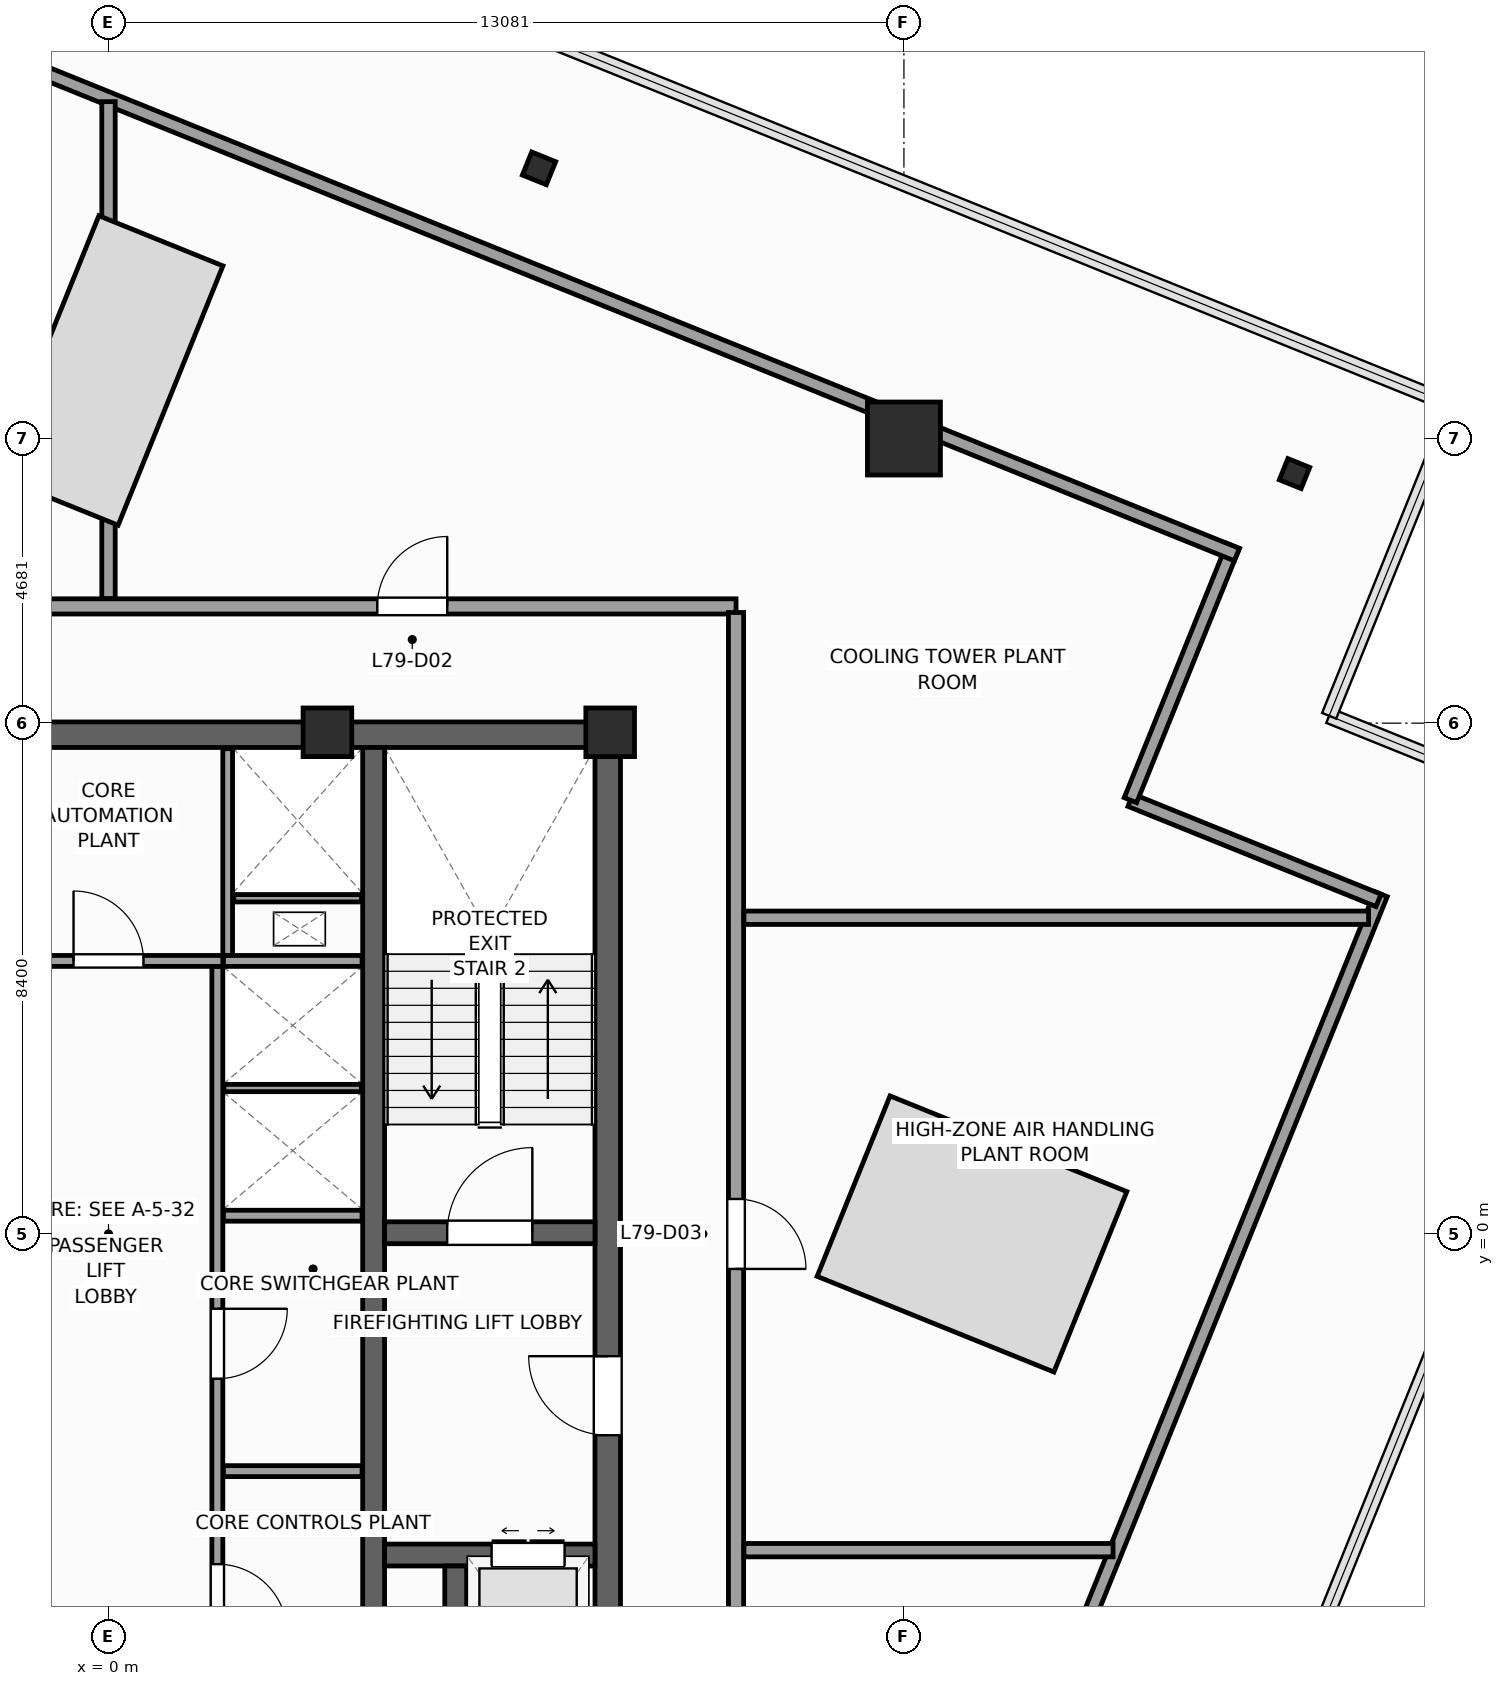
"""IFC4 building model, lengths in metres.
Left out: names, types, materials, properties, quantities, classifications, styles, units other than length and angle.
Written with IfcOpenShell. Run it as: python <this file> out.ifc"""

import sys

from ifc_helpers import new_model, si_unit, direction, frame, frame_2d, origin, origin_2d, place, context, subcontext, project, spatial, rectangle, i_section, extrude, source, transform, mapped, element, fill, save


model = new_model("IFC4")
c1 = context("Model", 3, precision=1e-05, world=origin(), true_north=direction((0.0, 1.0)))
c2 = subcontext(c1, "Body", "Model", "MODEL_VIEW")
j1 = project(units=[si_unit("LENGTHUNIT", "METRE"), si_unit("PLANEANGLEUNIT", "RADIAN")], contexts=[c1])
p1 = place(None, origin())
s1 = spatial("IfcSite", under=j1, at=p1, CompositionType="ELEMENT")
p2 = place(p1, origin())
s2 = spatial("IfcBuilding", under=s1, at=p2, CompositionType="ELEMENT")
p3 = place(p2, frame((0.0, 0.0, 321.6)))
s3 = spatial("IfcBuildingStorey", under=s2, at=p3, CompositionType="ELEMENT", Elevation=321.6)
p4 = place(p3, frame((-8.42, 8.21, 0.0), z_axis=(0.0, 0.0, 1.0), x_axis=(1.0, 0.0, 0.0)))
e1 = element("IfcWall", 1, at=p4, inside=s3, PredefinedType="SHEAR", context=c2, shape_type="SweptSolid", body=[
    extrude(rectangle(XDim=16.84, YDim=0.42, at=frame_2d((8.42, 0.0))), origin(), (0.0, 0.0, 1.0), 4.0),
])
p5 = place(p3, frame((8.21, -8.0, 0.0), z_axis=(0.0, 0.0, 1.0), x_axis=(0.0, 1.0, 0.0)))
e2 = element("IfcWall", 2, at=p5, inside=s3, PredefinedType="SHEAR", context=c2, shape_type="SweptSolid", body=[
    extrude(rectangle(XDim=16.0, YDim=0.42, at=frame_2d((8.0, 0.0))), origin(), (0.0, 0.0, 1.0), 4.0),
])
p6 = place(p5, frame((4.69, 0.0, 0.0)))
e3 = element("IfcOpeningElement", 3, at=p6, cuts=e2, PredefinedType="OPENING", context=c2, shape_type="SweptSolid", body=[
    extrude(rectangle(XDim=1.3, YDim=2.2, at=frame_2d((0.65, 1.1))), frame((0.0, 0.22, 0.0), z_axis=(0.0, -1.0, 0.0), x_axis=(1.0, 0.0, 0.0)), (0.0, 0.0, 1.0), 0.44),
])
p7 = place(p3, frame((4.36, -8.0, 0.0), z_axis=(0.0, 0.0, 1.0), x_axis=(0.0, 1.0, 0.0)))
e4 = element("IfcWall", 4, at=p7, inside=s3, PredefinedType="SHEAR", context=c2, shape_type="SweptSolid", body=[
    extrude(rectangle(XDim=16.0, YDim=0.36, at=frame_2d((8.0, 0.0))), origin(), (0.0, 0.0, 1.0), 4.0),
])
p8 = place(p3, frame((4.54, 0.02, 0.0), z_axis=(0.0, 0.0, 1.0), x_axis=(1.0, 0.0, 0.0)))
e5 = element("IfcWall", 5, at=p8, inside=s3, PredefinedType="SHEAR", context=c2, shape_type="SweptSolid", body=[
    extrude(rectangle(XDim=3.46, YDim=0.36, at=frame_2d((1.73, 0.0))), origin(), (0.0, 0.0, 1.0), 4.0),
])
p9 = place(p8, frame((1.03, 0.0, 0.0)))
e6 = element("IfcOpeningElement", 6, at=p9, cuts=e5, PredefinedType="OPENING", context=c2, shape_type="SweptSolid", body=[
    extrude(rectangle(XDim=1.4, YDim=2.2, at=frame_2d((0.7, 1.1))), frame((0.0, 0.19, 0.0), z_axis=(0.0, -1.0, 0.0), x_axis=(1.0, 0.0, 0.0)), (0.0, 0.0, 1.0), 0.38),
])
p10 = place(p3, frame((4.54, -5.28, 0.0), z_axis=(0.0, 0.0, 1.0), x_axis=(1.0, 0.0, 0.0)))
e7 = element("IfcWall", 7, at=p10, inside=s3, PredefinedType="SHEAR", context=c2, shape_type="SweptSolid", body=[
    extrude(rectangle(XDim=3.46, YDim=0.36, at=frame_2d((1.73, 0.0))), origin(), (0.0, 0.0, 1.0), 4.0),
])
p11 = place(p10, frame((1.76, 0.0, 0.0)))
e8 = element("IfcOpeningElement", 8, at=p11, cuts=e7, PredefinedType="OPENING", context=c2, shape_type="SweptSolid", body=[
    extrude(rectangle(XDim=1.2, YDim=2.25, at=frame_2d((0.6, 1.125))), frame((0.0, 0.19, 0.0), z_axis=(0.0, -1.0, 0.0), x_axis=(1.0, 0.0, 0.0)), (0.0, 0.0, 1.0), 0.38),
])
p12 = place(p3, frame((5.71, -8.0, 0.0), z_axis=(0.0, 0.0, 1.0), x_axis=(0.0, 1.0, 0.0)))
e9 = element("IfcWall", 9, at=p12, inside=s3, PredefinedType="SHEAR", context=c2, shape_type="SweptSolid", body=[
    extrude(rectangle(XDim=2.54, YDim=0.36, at=frame_2d((1.27, 0.0))), origin(), (0.0, 0.0, 1.0), 4.0),
])
m1 = source(origin(), c2, "Body", "SweptSolid", [
    extrude(rectangle(XDim=0.8, YDim=0.8, at=origin_2d()), origin(), (0.0, 0.0, 1.0), 4.0),
])
for number, where, z_axis, x_axis in (
    (10, (8.25, 8.25, 0.0), (0.0, 0.0, 1.0), (1.0, 0.0, 0.0)),
    (11, (3.6, 8.25, 0.0), (0.0, 0.0, 1.0), (1.0, 0.0, 0.0)),
):
    element("IfcColumn", number, at=place(p3, frame(where, z_axis=z_axis, x_axis=x_axis)), inside=s3, PredefinedType="PILASTER", context=c2, shape_type="MappedRepresentation", body=[
        mapped(m1, transform((0.0, 0.0, 0.0), scale=1.0)),
    ])
m2 = source(origin(), c2, "Body", "SweptSolid", [
    extrude(rectangle(XDim=1.2, YDim=1.2, at=origin_2d()), origin(), (0.0, 0.0, 1.0), 4.0),
])
p13 = place(p3, frame((13.081, 13.081, 0.0), z_axis=(0.0, 0.0, 1.0), x_axis=(1.0, 0.0, 0.0)))
e12 = element("IfcColumn", 12, at=p13, inside=s3, PredefinedType="COLUMN", context=c2, shape_type="MappedRepresentation", body=[
    mapped(m2, transform((0.0, 0.0, 0.0), scale=1.0)),
])
m3 = source(origin(), c2, "Body", "SweptSolid", [
    extrude(i_section(OverallWidth=0.376, OverallDepth=0.387, WebThickness=0.02, FlangeThickness=0.032, FilletRadius=0.015, at=origin_2d()), origin(), (0.0, 0.0, 1.0), 4.0),
])
p14 = place(p3, frame((19.504, 12.504, 0.0), z_axis=(0.0, 0.0, 1.0), x_axis=(0.374606593416, 0.927183854567, 0.0)))
e13 = element("IfcColumn", 13, at=p14, inside=s3, PredefinedType="COLUMN", context=c2, shape_type="MappedRepresentation", body=[
    mapped(m3, transform((0.0, 0.0, 0.0), scale=1.0)),
])
m4 = source(origin(), c2, "Body", "SweptSolid", [
    extrude(i_section(OverallWidth=0.409, OverallDepth=0.425, WebThickness=0.024, FlangeThickness=0.039, FilletRadius=0.015, at=origin_2d()), origin(), (0.0, 0.0, 1.0), 4.0),
])
p15 = place(p3, frame((7.08, 17.524, 0.0), z_axis=(0.0, 0.0, 1.0), x_axis=(0.374606593416, 0.927183854567, 0.0)))
e14 = element("IfcColumn", 14, at=p15, inside=s3, PredefinedType="COLUMN", context=c2, shape_type="MappedRepresentation", body=[
    mapped(m4, transform((0.0, 0.0, 0.0), scale=1.0)),
])
p16 = place(p3, frame((1.79, -7.98, 0.0), z_axis=(0.0, 0.0, 1.0), x_axis=(0.0, 1.0, 0.0)))
e15 = element("IfcWall", 15, at=p16, inside=s3, PredefinedType="PARTITIONING", context=c2, shape_type="SweptSolid", body=[
    extrude(rectangle(XDim=12.38, YDim=0.18, at=frame_2d((6.19, 0.0))), origin(), (0.0, 0.0, 1.0), 3.7),
])
p17 = place(p16, frame((1.4, 0.0, 0.0)))
e16 = element("IfcOpeningElement", 16, at=p17, cuts=e15, PredefinedType="OPENING", context=c2, shape_type="SweptSolid", body=[
    extrude(rectangle(XDim=1.15, YDim=2.25, at=frame_2d((0.575, 1.125))), frame((0.0, 0.1, 0.0), z_axis=(0.0, -1.0, 0.0), x_axis=(1.0, 0.0, 0.0)), (0.0, 0.0, 1.0), 0.2),
])
p18 = place(p16, frame((5.6, 0.0, 0.0)))
e17 = element("IfcOpeningElement", 17, at=p18, cuts=e15, PredefinedType="OPENING", context=c2, shape_type="SweptSolid", body=[
    extrude(rectangle(XDim=1.15, YDim=2.25, at=frame_2d((0.575, 1.125))), frame((0.0, 0.1, 0.0), z_axis=(0.0, -1.0, 0.0), x_axis=(1.0, 0.0, 0.0)), (0.0, 0.0, 1.0), 0.2),
])
p19 = place(p3, frame((-1.88, 4.49, 0.0), z_axis=(0.0, 0.0, 1.0), x_axis=(1.0, 0.0, 0.0)))
e18 = element("IfcWall", 18, at=p19, inside=s3, PredefinedType="PARTITIONING", context=c2, shape_type="SweptSolid", body=[
    extrude(rectangle(XDim=3.76, YDim=0.18, at=frame_2d((1.88, 0.0))), origin(), (0.0, 0.0, 1.0), 3.7),
])
p20 = place(p19, frame((1.305, 0.0, 0.0)))
e19 = element("IfcOpeningElement", 19, at=p20, cuts=e18, PredefinedType="OPENING", context=c2, shape_type="SweptSolid", body=[
    extrude(rectangle(XDim=1.15, YDim=2.25, at=frame_2d((0.575, 1.125))), frame((0.0, 0.1, 0.0), z_axis=(0.0, -1.0, 0.0), x_axis=(1.0, 0.0, 0.0)), (0.0, 0.0, 1.0), 0.2),
])
for number, where, z_axis, x_axis in (
    (20, (1.89, -3.9, 0.0), (0.0, 0.0, 1.0), (1.0, 0.0, 0.0)),
    (21, (1.89, 0.3, 0.0), (0.0, 0.0, 1.0), (1.0, 0.0, 0.0)),
    (22, (1.89, 4.49, 0.0), (0.0, 0.0, 1.0), (1.0, 0.0, 0.0)),
):
    element("IfcWall", number, at=place(p3, frame(where, z_axis=z_axis, x_axis=x_axis)), inside=s3, PredefinedType="PARTITIONING", context=c2, shape_type="SweptSolid", body=[
        extrude(rectangle(XDim=2.28, YDim=0.18, at=frame_2d((1.14, 0.0))), origin(), (0.0, 0.0, 1.0), 3.7),
    ])
p21 = place(p3, frame((1.9, 2.4, 0.0), z_axis=(0.0, 0.0, 1.0), x_axis=(1.0, 0.0, 0.0)))
e23 = element("IfcWall", 23, at=p21, inside=s3, PredefinedType="PARTITIONING", context=c2, shape_type="SweptSolid", body=[
    extrude(rectangle(XDim=2.26, YDim=0.12, at=frame_2d((1.13, 0.0))), origin(), (0.0, 0.0, 1.0), 3.7),
])
p22 = place(p3, frame((1.96, 4.58, 0.0), z_axis=(0.0, 0.0, 1.0), x_axis=(0.0, 1.0, 0.0)))
e24 = element("IfcWall", 24, at=p22, inside=s3, PredefinedType="PARTITIONING", context=c2, shape_type="SweptSolid", body=[
    extrude(rectangle(XDim=3.4, YDim=0.16, at=frame_2d((1.7, 0.0))), origin(), (0.0, 0.0, 1.0), 3.7),
])
p23 = place(p3, frame((2.06, 5.52, 0.0), z_axis=(0.0, 0.0, 1.0), x_axis=(1.0, 0.0, 0.0)))
e25 = element("IfcWall", 25, at=p23, inside=s3, PredefinedType="PARTITIONING", context=c2, shape_type="SweptSolid", body=[
    extrude(rectangle(XDim=2.1, YDim=0.12, at=frame_2d((1.05, 0.0))), origin(), (0.0, 0.0, 1.0), 3.7),
])
p24 = place(p3, frame((11.172, -18.556, 0.0), z_axis=(0.0, 0.0, 1.0), x_axis=(0.374611707018, 0.927181788521, 0.0)))
e26 = element("IfcWall", 26, at=p24, inside=s3, PredefinedType="PARTITIONING", context=c2, shape_type="SweptSolid", body=[
    extrude(rectangle(XDim=26.04, YDim=0.22, at=frame_2d((13.02, 0.0))), origin(), (0.0, 0.0, 1.0), 3.05),
])
p25 = place(p3, frame((20.886, 5.486, 0.0), z_axis=(0.0, 0.0, 1.0), x_axis=(-0.927189216671, 0.374593321469, 0.0)))
e27 = element("IfcWall", 27, at=p25, inside=s3, PredefinedType="PARTITIONING", context=c2, shape_type="SweptSolid", body=[
    extrude(rectangle(XDim=4.4, YDim=0.22, at=frame_2d((2.2, 0.0))), origin(), (0.0, 0.0, 1.0), 3.7),
])
p26 = place(p3, frame((16.806, 7.134, 0.0), z_axis=(0.0, 0.0, 1.0), x_axis=(0.374599091925, 0.927186885331, 0.0)))
e28 = element("IfcWall", 28, at=p26, inside=s3, PredefinedType="PARTITIONING", context=c2, shape_type="SweptSolid", body=[
    extrude(rectangle(XDim=4.51, YDim=0.22, at=frame_2d((2.255, 0.0))), origin(), (0.0, 0.0, 1.0), 3.7),
])
p27 = place(p3, frame((18.556, 11.172, 0.0), z_axis=(0.0, 0.0, 1.0), x_axis=(-0.927181788521, 0.374611707018, 0.0)))
e29 = element("IfcWall", 29, at=p27, inside=s3, PredefinedType="PARTITIONING", context=c2, shape_type="SweptSolid", body=[
    extrude(rectangle(XDim=26.04, YDim=0.22, at=frame_2d((13.02, 0.0))), origin(), (0.0, 0.0, 1.0), 3.05),
])
p28 = place(p3, frame((-10.32, 10.32, 0.0), z_axis=(0.0, 0.0, 1.0), x_axis=(1.0, 0.0, 0.0)))
e30 = element("IfcWall", 30, at=p28, inside=s3, PredefinedType="PARTITIONING", context=c2, shape_type="SweptSolid", body=[
    extrude(rectangle(XDim=20.64, YDim=0.25, at=frame_2d((10.32, 0.0))), origin(), (0.0, 0.0, 1.0), 3.7),
])
p29 = place(p28, frame((4.75, 0.0, 0.0)))
e31 = element("IfcOpeningElement", 31, at=p29, cuts=e30, PredefinedType="OPENING", context=c2, shape_type="SweptSolid", body=[
    extrude(rectangle(XDim=1.15, YDim=2.25, at=frame_2d((0.575, 1.125))), frame((0.0, 0.135, 0.0), z_axis=(0.0, -1.0, 0.0), x_axis=(1.0, 0.0, 0.0)), (0.0, 0.0, 1.0), 0.27),
])
p30 = place(p28, frame((14.74, 0.0, 0.0)))
e32 = element("IfcOpeningElement", 32, at=p30, cuts=e30, PredefinedType="OPENING", context=c2, shape_type="SweptSolid", body=[
    extrude(rectangle(XDim=1.15, YDim=2.25, at=frame_2d((0.575, 1.125))), frame((0.0, 0.135, 0.0), z_axis=(0.0, -1.0, 0.0), x_axis=(1.0, 0.0, 0.0)), (0.0, 0.0, 1.0), 0.27),
])
p31 = place(p3, frame((10.32, -10.22, 0.0), z_axis=(0.0, 0.0, 1.0), x_axis=(0.0, 1.0, 0.0)))
e33 = element("IfcWall", 33, at=p31, inside=s3, PredefinedType="PARTITIONING", context=c2, shape_type="SweptSolid", body=[
    extrude(rectangle(XDim=20.44, YDim=0.25, at=frame_2d((10.22, 0.0))), origin(), (0.0, 0.0, 1.0), 3.7),
])
p32 = place(p31, frame((9.645, 0.0, 0.0)))
e34 = element("IfcOpeningElement", 34, at=p32, cuts=e33, PredefinedType="OPENING", context=c2, shape_type="SweptSolid", body=[
    extrude(rectangle(XDim=1.15, YDim=2.25, at=frame_2d((0.575, 1.125))), frame((0.0, 0.135, 0.0), z_axis=(0.0, -1.0, 0.0), x_axis=(1.0, 0.0, 0.0)), (0.0, 0.0, 1.0), 0.27),
])
p33 = place(p3, frame((0.0, 10.45, 0.0), z_axis=(0.0, 0.0, 1.0), x_axis=(0.0, 1.0, 0.0)))
e35 = element("IfcWall", 35, at=p33, inside=s3, PredefinedType="PARTITIONING", context=c2, shape_type="SweptSolid", body=[
    extrude(rectangle(XDim=8.171, YDim=0.22, at=frame_2d((4.085, 0.0))), origin(), (0.0, 0.0, 1.0), 3.7),
])
p34 = place(p3, frame((10.45, 5.2, 0.0), z_axis=(0.0, 0.0, 1.0), x_axis=(1.0, 0.0, 0.0)))
e36 = element("IfcWall", 36, at=p34, inside=s3, PredefinedType="PARTITIONING", context=c2, shape_type="SweptSolid", body=[
    extrude(rectangle(XDim=10.272, YDim=0.22, at=frame_2d((5.136, 0.0))), origin(), (0.0, 0.0, 1.0), 3.7),
])
p35 = place(p3, frame((10.45, -5.2, 0.0), z_axis=(0.0, 0.0, 1.0), x_axis=(1.0, 0.0, 0.0)))
e37 = element("IfcWall", 37, at=p35, inside=s3, PredefinedType="PARTITIONING", context=c2, shape_type="SweptSolid", body=[
    extrude(rectangle(XDim=6.07, YDim=0.22, at=frame_2d((3.035, 0.0))), origin(), (0.0, 0.0, 1.0), 3.7),
])
m5 = source(origin(), c2, "Body", "SweptSolid", [
    extrude(rectangle(XDim=1.4, YDim=2.2, at=frame_2d((0.7, 1.1))), frame((0.0, 0.025, 0.0), z_axis=(0.0, -1.0, 0.0), x_axis=(1.0, 0.0, 0.0)), (0.0, 0.0, 1.0), 0.05),
])
p36 = place(p9, origin())
e38 = element("IfcDoor", 38, at=p36, inside=s3, OperationType="SINGLE_SWING_RIGHT", PredefinedType="DOOR", context=c2, shape_type="MappedRepresentation", body=[
    mapped(m5, transform((0.0, 0.0, 0.0), scale=1.0)),
])
fill(e6, e38)
m6 = source(origin(), c2, "Body", "SweptSolid", [
    extrude(rectangle(XDim=1.3, YDim=2.2, at=frame_2d((0.65, 1.1))), frame((0.0, 0.025, 0.0), z_axis=(0.0, -1.0, 0.0), x_axis=(1.0, 0.0, 0.0)), (0.0, 0.0, 1.0), 0.05),
])
p37 = place(p6, origin())
e39 = element("IfcDoor", 39, at=p37, inside=s3, OperationType="SINGLE_SWING_RIGHT", PredefinedType="DOOR", context=c2, shape_type="MappedRepresentation", body=[
    mapped(m6, transform((0.0, 0.0, 0.0), scale=1.0)),
])
fill(e3, e39)
m7 = source(origin(), c2, "Body", "SweptSolid", [
    extrude(rectangle(XDim=1.2, YDim=2.25, at=frame_2d((0.6, 1.125))), frame((0.0, 0.025, 0.0), z_axis=(0.0, -1.0, 0.0), x_axis=(1.0, 0.0, 0.0)), (0.0, 0.0, 1.0), 0.05),
])
p38 = place(p11, origin())
e40 = element("IfcDoor", 40, at=p38, inside=s3, OperationType="DOUBLE_DOOR_SLIDING", PredefinedType="DOOR", context=c2, shape_type="MappedRepresentation", body=[
    mapped(m7, transform((0.0, 0.0, 0.0), scale=1.0)),
])
fill(e8, e40)
m8 = source(origin(), c2, "Body", "SweptSolid", [
    extrude(rectangle(XDim=1.15, YDim=2.25, at=frame_2d((0.575, 1.125))), frame((0.0, 0.025, 0.0), z_axis=(0.0, -1.0, 0.0), x_axis=(1.0, 0.0, 0.0)), (0.0, 0.0, 1.0), 0.05),
])
p39 = place(p17, frame((1.15, 0.0, 0.0), z_axis=(0.0, 0.0, 1.0), x_axis=(-1.0, 0.0, 0.0)))
e41 = element("IfcDoor", 41, at=p39, inside=s3, OperationType="SINGLE_SWING_LEFT", PredefinedType="DOOR", context=c2, shape_type="MappedRepresentation", body=[
    mapped(m8, transform((0.0, 0.0, 0.0), scale=1.0)),
])
fill(e16, e41)
p40 = place(p18, frame((1.15, 0.0, 0.0), z_axis=(0.0, 0.0, 1.0), x_axis=(-1.0, 0.0, 0.0)))
e42 = element("IfcDoor", 42, at=p40, inside=s3, OperationType="SINGLE_SWING_RIGHT", PredefinedType="DOOR", context=c2, shape_type="MappedRepresentation", body=[
    mapped(m8, transform((0.0, 0.0, 0.0), scale=1.0)),
])
fill(e17, e42)
p41 = place(p20, origin())
e43 = element("IfcDoor", 43, at=p41, inside=s3, OperationType="SINGLE_SWING_LEFT", PredefinedType="DOOR", context=c2, shape_type="MappedRepresentation", body=[
    mapped(m8, transform((0.0, 0.0, 0.0), scale=1.0)),
])
fill(e19, e43)
p42 = place(p30, origin())
e44 = element("IfcDoor", 44, at=p42, inside=s3, OperationType="SINGLE_SWING_RIGHT", PredefinedType="DOOR", context=c2, shape_type="MappedRepresentation", body=[
    mapped(m8, transform((0.0, 0.0, 0.0), scale=1.0)),
])
fill(e32, e44)
p43 = place(p32, frame((1.15, 0.0, 0.0), z_axis=(0.0, 0.0, 1.0), x_axis=(-1.0, 0.0, 0.0)))
e45 = element("IfcDoor", 45, at=p43, inside=s3, OperationType="SINGLE_SWING_LEFT", PredefinedType="DOOR", context=c2, shape_type="MappedRepresentation", body=[
    mapped(m8, transform((0.0, 0.0, 0.0), scale=1.0)),
])
fill(e34, e45)
save(model, sys.argv[1])
